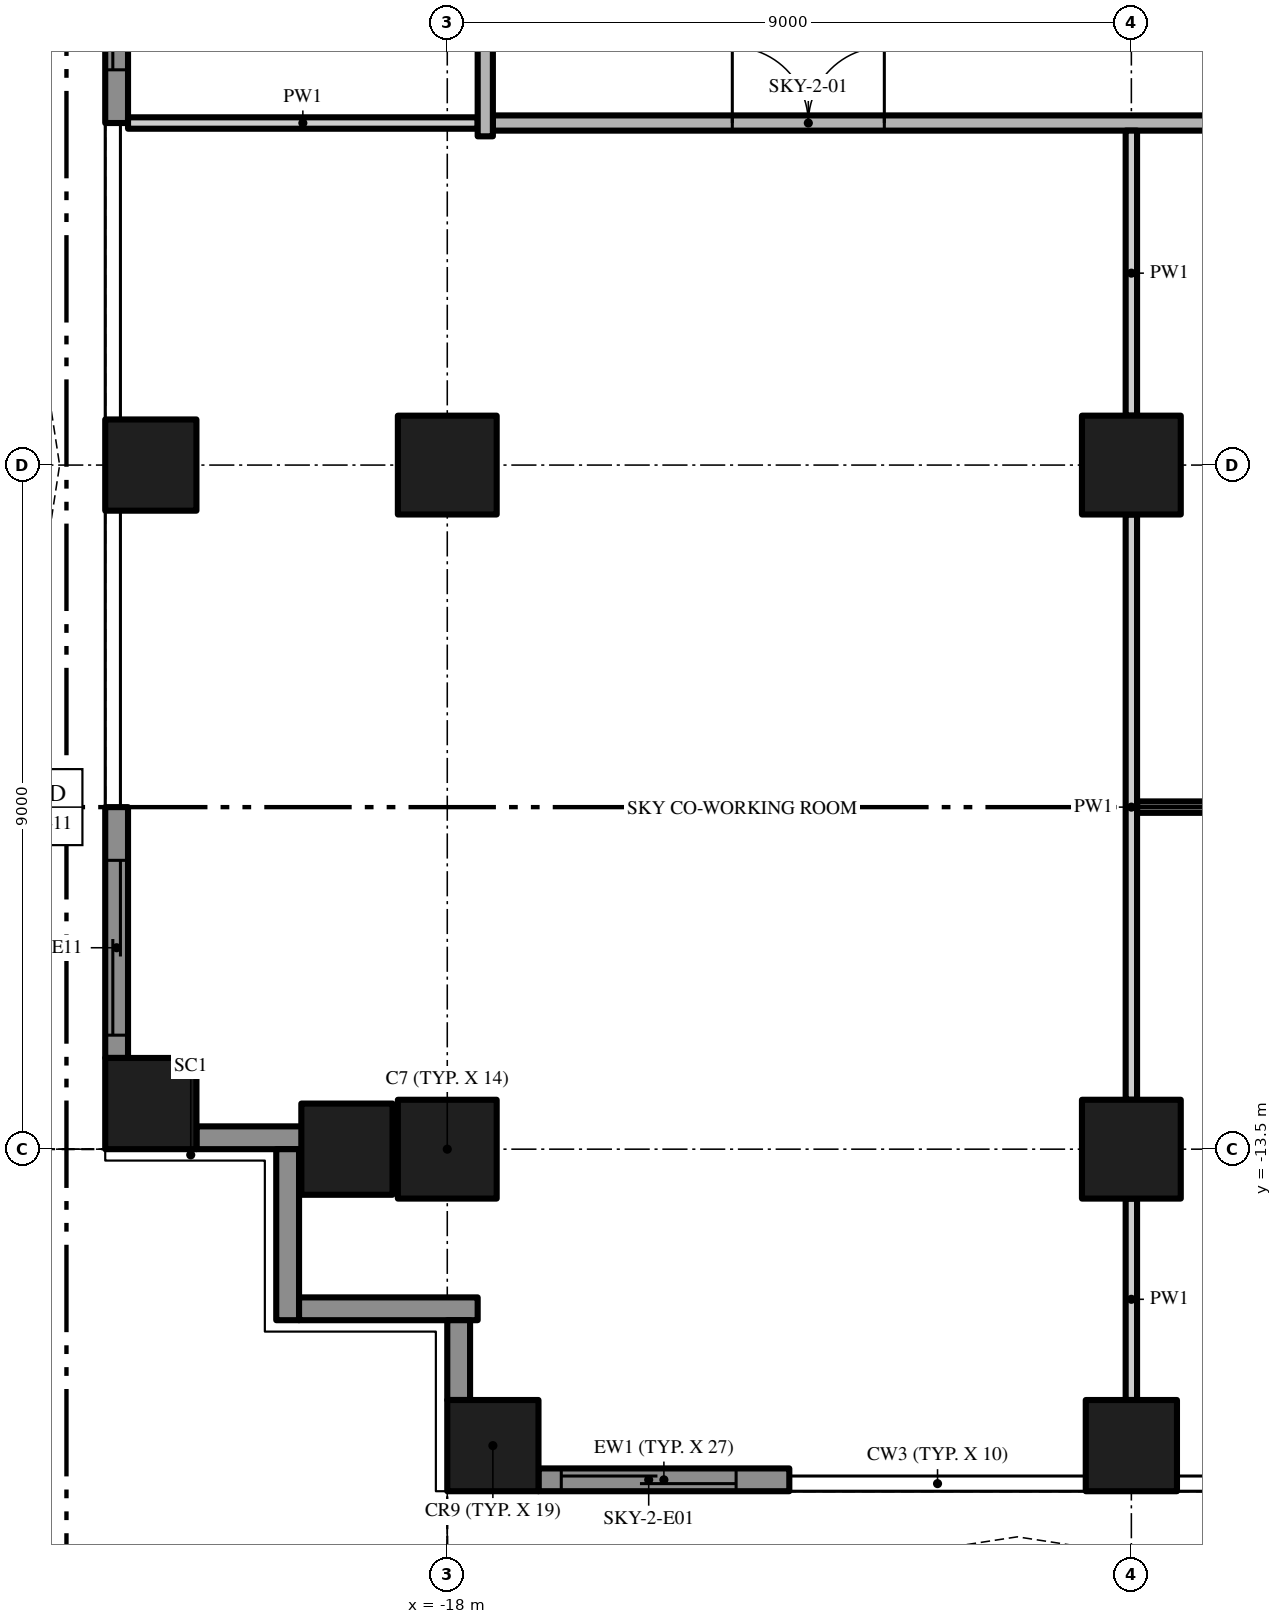
"""IFC4 building model, lengths in metres.
Left out: names, types, materials, properties, quantities, classifications, styles, units other than length and angle.
Written with IfcOpenShell. Run it as: python <this file> out.ifc"""

import sys

from ifc_helpers import new_model, si_unit, direction, frame, frame_2d, origin, origin_2d, place, context, subcontext, project, spatial, polyline, rectangle, outline, extrude, element, fill, save


model = new_model("IFC4")
c1 = context("Model", 3, precision=1e-05, world=origin(), true_north=direction((0.0, 1.0)))
c2 = subcontext(c1, "Body", "Model", "MODEL_VIEW")
j1 = project(units=[si_unit("LENGTHUNIT", "METRE"), si_unit("PLANEANGLEUNIT", "RADIAN")], contexts=[c1])
p1 = place(None, origin())
s1 = spatial("IfcSite", under=j1, at=p1, CompositionType="ELEMENT")
p2 = place(p1, origin())
s2 = spatial("IfcBuilding", under=s1, at=p2, CompositionType="ELEMENT")
p3 = place(p2, frame((0.0, 0.0, 120.0)))
s3 = spatial("IfcBuildingStorey", under=s2, at=p3, CompositionType="ELEMENT", Elevation=120.0)
p4 = place(p3, frame((-18.0, -13.5, 0.0), z_axis=(0.0, 0.0, 1.0), x_axis=(1.0, 0.0, 0.0)))
e1 = element("IfcColumn", 1, at=p4, inside=s3, PredefinedType="COLUMN", context=c2, shape_type="SweptSolid", body=[
    extrude(rectangle(XDim=1.3, YDim=1.3, at=origin_2d()), origin(), (0.0, 0.0, 1.0), 4.7),
])
p5 = place(p3, frame((-17.4, -17.4, 0.0), z_axis=(0.0, 0.0, 1.0), x_axis=(1.0, 0.0, 0.0)))
e2 = element("IfcColumn", 2, at=p5, inside=s3, PredefinedType="COLUMN", context=c2, shape_type="SweptSolid", body=[
    extrude(rectangle(XDim=1.2, YDim=1.2, at=origin_2d()), origin(), (0.0, 0.0, 1.0), 4.7),
])
p6 = place(p3, frame((-18.0, -4.5, 0.0), z_axis=(0.0, 0.0, 1.0), x_axis=(1.0, 0.0, 0.0)))
e3 = element("IfcColumn", 3, at=p6, inside=s3, PredefinedType="COLUMN", context=c2, shape_type="SweptSolid", body=[
    extrude(rectangle(XDim=1.3, YDim=1.3, at=origin_2d()), origin(), (0.0, 0.0, 1.0), 4.7),
])
for number, where, z_axis, x_axis in (
    (4, (-21.9, -12.9, 0.0), (0.0, 0.0, 1.0), (1.0, 0.0, 0.0)),
    (5, (-19.32, -13.5, 0.0), (0.0, 0.0, 1.0), (1.0, 0.0, 0.0)),
    (6, (-21.9, -4.5, 0.0), (0.0, 0.0, 1.0), (1.0, 0.0, 0.0)),
):
    element("IfcColumn", number, at=place(p3, frame(where, z_axis=z_axis, x_axis=x_axis)), inside=s3, PredefinedType="COLUMN", context=c2, shape_type="SweptSolid", body=[
        extrude(rectangle(XDim=1.2, YDim=1.2, at=origin_2d()), origin(), (0.0, 0.0, 1.0), 4.7),
    ])
p7 = place(p3, frame((-9.0, -13.5, 0.0), z_axis=(0.0, 0.0, 1.0), x_axis=(1.0, 0.0, 0.0)))
e7 = element("IfcColumn", 7, at=p7, inside=s3, PredefinedType="COLUMN", context=c2, shape_type="SweptSolid", body=[
    extrude(rectangle(XDim=1.3, YDim=1.3, at=origin_2d()), origin(), (0.0, 0.0, 1.0), 4.7),
])
p8 = place(p3, frame((-9.0, -17.4, 0.0), z_axis=(0.0, 0.0, 1.0), x_axis=(1.0, 0.0, 0.0)))
e8 = element("IfcColumn", 8, at=p8, inside=s3, PredefinedType="COLUMN", context=c2, shape_type="SweptSolid", body=[
    extrude(rectangle(XDim=1.2, YDim=1.2, at=origin_2d()), origin(), (0.0, 0.0, 1.0), 4.7),
])
p9 = place(p3, frame((-9.0, -4.5, 0.0), z_axis=(0.0, 0.0, 1.0), x_axis=(1.0, 0.0, 0.0)))
e9 = element("IfcColumn", 9, at=p9, inside=s3, PredefinedType="COLUMN", context=c2, shape_type="SweptSolid", body=[
    extrude(rectangle(XDim=1.3, YDim=1.3, at=origin_2d()), origin(), (0.0, 0.0, 1.0), 4.7),
])
p10 = place(p3, frame((-13.5, -17.85, 0.0), z_axis=(0.0, 0.0, 1.0), x_axis=(-1.0, 0.0, 0.0)))
e10 = element("IfcWall", 10, at=p10, inside=s3, PredefinedType="SOLIDWALL", context=c2, shape_type="SweptSolid", body=[
    extrude(rectangle(XDim=3.3, YDim=0.3, at=frame_2d((1.65, 0.0))), origin(), (0.0, 0.0, 1.0), 4.7),
])
p11 = place(p10, frame((0.7, 0.0, 0.0)))
e11 = element("IfcOpeningElement", 11, at=p11, cuts=e10, PredefinedType="OPENING", context=c2, shape_type="SweptSolid", body=[
    extrude(rectangle(XDim=2.3, YDim=2.4, at=frame_2d((1.15, 1.2))), frame((0.0, 0.16, 0.0), z_axis=(0.0, -1.0, 0.0), x_axis=(1.0, 0.0, 0.0)), (0.0, 0.0, 1.0), 0.32),
])
p12 = place(p3, frame((-22.35, 0.0, 0.0), z_axis=(0.0, 0.0, 1.0), x_axis=(0.0, 1.0, 0.0)))
e12 = element("IfcWall", 12, at=p12, inside=s3, PredefinedType="SOLIDWALL", context=c2, shape_type="SweptSolid", body=[
    extrude(rectangle(XDim=3.9, YDim=0.3, at=frame_2d((1.95, 0.0))), origin(), (0.0, 0.0, 1.0), 4.7),
])
p13 = place(p12, frame((0.7, 0.0, 0.0)))
e13 = element("IfcOpeningElement", 13, at=p13, cuts=e12, PredefinedType="OPENING", context=c2, shape_type="SweptSolid", body=[
    extrude(rectangle(XDim=2.9, YDim=2.4, at=frame_2d((1.45, 1.2))), frame((0.0, 0.16, 0.0), z_axis=(0.0, -1.0, 0.0), x_axis=(1.0, 0.0, 0.0)), (0.0, 0.0, 1.0), 0.32),
])
p14 = place(p3, frame((-22.35, -12.3, 0.0), z_axis=(0.0, 0.0, 1.0), x_axis=(0.0, 1.0, 0.0)))
e14 = element("IfcWall", 14, at=p14, inside=s3, PredefinedType="SOLIDWALL", context=c2, shape_type="SweptSolid", body=[
    extrude(rectangle(XDim=3.3, YDim=0.3, at=frame_2d((1.65, 0.0))), origin(), (0.0, 0.0, 1.0), 4.7),
])
p15 = place(p14, frame((0.3, 0.0, 0.0)))
e15 = element("IfcOpeningElement", 15, at=p15, cuts=e14, PredefinedType="OPENING", context=c2, shape_type="SweptSolid", body=[
    extrude(rectangle(XDim=2.3, YDim=2.4, at=frame_2d((1.15, 1.2))), frame((0.0, 0.16, 0.0), z_axis=(0.0, -1.0, 0.0), x_axis=(1.0, 0.0, 0.0)), (0.0, 0.0, 1.0), 0.32),
])
p16 = place(p3, frame((-19.85, -13.35, 0.0), z_axis=(0.0, 0.0, 1.0), x_axis=(-1.0, 0.0, 0.0)))
e16 = element("IfcWall", 16, at=p16, inside=s3, PredefinedType="SOLIDWALL", context=c2, shape_type="SweptSolid", body=[
    extrude(rectangle(XDim=1.45, YDim=0.3, at=frame_2d((0.725, 0.0))), origin(), (0.0, 0.0, 1.0), 4.7),
])
p17 = place(p3, frame((-20.1, -15.75, 0.0), z_axis=(0.0, 0.0, 1.0), x_axis=(0.0, 1.0, 0.0)))
e17 = element("IfcWall", 17, at=p17, inside=s3, PredefinedType="SOLIDWALL", context=c2, shape_type="SweptSolid", body=[
    extrude(rectangle(XDim=2.25, YDim=0.3, at=frame_2d((1.125, 0.0))), origin(), (0.0, 0.0, 1.0), 4.7),
])
p18 = place(p3, frame((-17.6, -15.6, 0.0), z_axis=(0.0, 0.0, 1.0), x_axis=(-1.0, 0.0, 0.0)))
e18 = element("IfcWall", 18, at=p18, inside=s3, PredefinedType="SOLIDWALL", context=c2, shape_type="SweptSolid", body=[
    extrude(rectangle(XDim=2.35, YDim=0.3, at=frame_2d((1.175, 0.0))), origin(), (0.0, 0.0, 1.0), 4.7),
])
p19 = place(p3, frame((-17.85, -16.8, 0.0), z_axis=(0.0, 0.0, 1.0), x_axis=(0.0, 1.0, 0.0)))
e19 = element("IfcWall", 19, at=p19, inside=s3, PredefinedType="SOLIDWALL", context=c2, shape_type="SweptSolid", body=[
    extrude(rectangle(XDim=1.05, YDim=0.3, at=frame_2d((0.525, 0.0))), origin(), (0.0, 0.0, 1.0), 4.7),
])
p20 = place(p3, origin())
e20 = element("IfcWall", 20, at=p20, inside=s3, PredefinedType="USERDEFINED", context=c2, shape_type="SweptSolid", body=[
    extrude(outline(polyline([(-18.0, -21.0), (-16.5, -20.771), (-15.0, -20.171), (-13.5, -19.429), (-12.0, -18.829), (-10.5, -18.6), (-9.0, -18.829), (-7.5, -19.429), (-6.0, -20.171), (-4.5, -20.771), (-3.0, -21.0), (-1.5, -20.771), (0.0, -20.171), (1.5, -19.429), (3.0, -18.829), (4.5, -18.6), (6.0, -18.829), (7.5, -19.429), (9.0, -20.171), (10.5, -20.771), (12.0, -21.0), (13.5, -20.771), (15.0, -20.171), (16.5, -19.429), (18.0, -18.829), (17.907, -18.597), (16.398, -19.201), (14.898, -19.942), (13.434, -20.528), (12.0, -20.747), (10.566, -20.528), (9.102, -19.942), (7.602, -19.201), (6.066, -18.586), (4.5, -18.347), (2.934, -18.586), (1.398, -19.201), (-0.102, -19.942), (-1.566, -20.528), (-3.0, -20.747), (-4.434, -20.528), (-5.898, -19.942), (-7.398, -19.201), (-8.934, -18.586), (-10.5, -18.347), (-12.066, -18.586), (-13.602, -19.201), (-15.102, -19.942), (-16.566, -20.528), (-18.038, -20.753), (-18.0, -21.0)])), origin(), (0.0, 0.0, 1.0), 0.9),
])
p21 = place(p3, origin())
e21 = element("IfcWall", 21, at=p21, inside=s3, PredefinedType="USERDEFINED", context=c2, shape_type="SweptSolid", body=[
    extrude(outline(polyline([(-25.5, 18.0), (-25.271, 16.5), (-24.671, 15.0), (-23.929, 13.5), (-23.329, 12.0), (-23.1, 10.5), (-23.329, 9.0), (-23.929, 7.5), (-24.671, 6.0), (-25.271, 4.5), (-25.5, 3.0), (-25.271, 1.5), (-24.671, 0.0), (-23.929, -1.5), (-23.329, -3.0), (-23.1, -4.5), (-23.329, -6.0), (-23.929, -7.5), (-24.671, -9.0), (-25.271, -10.5), (-25.5, -12.0), (-25.271, -13.5), (-25.024, -13.462), (-25.247, -12.0), (-25.028, -10.566), (-24.442, -9.102), (-23.701, -7.602), (-23.086, -6.066), (-22.847, -4.5), (-23.086, -2.934), (-23.701, -1.398), (-24.442, 0.102), (-25.028, 1.566), (-25.247, 3.0), (-25.028, 4.434), (-24.442, 5.898), (-23.701, 7.398), (-23.086, 8.934), (-22.847, 10.5), (-23.086, 12.066), (-23.701, 13.602), (-24.442, 15.102), (-25.028, 16.566), (-25.253, 18.038), (-25.5, 18.0)])), origin(), (0.0, 0.0, 1.0), 0.9),
])
p22 = place(p3, frame((-8.925, -9.0, 0.0), z_axis=(0.0, 0.0, 1.0), x_axis=(1.0, 0.0, 0.0)))
e22 = element("IfcWall", 22, at=p22, inside=s3, PredefinedType="PARTITIONING", context=c2, shape_type="SweptSolid", body=[
    extrude(rectangle(XDim=17.85, YDim=0.15, at=frame_2d((8.925, 0.0))), origin(), (0.0, 0.0, 1.0), 4.7),
])
p23 = place(p22, frame((8.05, 0.0, 0.0)))
e23 = element("IfcOpeningElement", 23, at=p23, cuts=e22, PredefinedType="OPENING", context=c2, shape_type="SweptSolid", body=[
    extrude(rectangle(XDim=1.8, YDim=2.4, at=frame_2d((0.9, 1.2))), frame((0.0, 0.085, 0.0), z_axis=(0.0, -1.0, 0.0), x_axis=(1.0, 0.0, 0.0)), (0.0, 0.0, 1.0), 0.17),
])
p24 = place(p3, frame((-17.4, 0.0, 0.0), z_axis=(0.0, 0.0, 1.0), x_axis=(1.0, 0.0, 0.0)))
e24 = element("IfcWall", 24, at=p24, inside=s3, PredefinedType="PARTITIONING", context=c2, shape_type="SweptSolid", body=[
    extrude(rectangle(XDim=34.8, YDim=0.2, at=frame_2d((17.4, 0.0))), origin(), (0.0, 0.0, 1.0), 4.7),
])
p25 = place(p24, frame((3.15, 0.0, 0.0)))
e25 = element("IfcOpeningElement", 25, at=p25, cuts=e24, PredefinedType="OPENING", context=c2, shape_type="SweptSolid", body=[
    extrude(rectangle(XDim=2.0, YDim=2.4, at=frame_2d((1.0, 1.2))), frame((0.0, 0.11, 0.0), z_axis=(0.0, -1.0, 0.0), x_axis=(1.0, 0.0, 0.0)), (0.0, 0.0, 1.0), 0.22),
])
p26 = place(p24, frame((16.4, 0.0, 0.0)))
e26 = element("IfcOpeningElement", 26, at=p26, cuts=e24, PredefinedType="OPENING", context=c2, shape_type="SweptSolid", body=[
    extrude(rectangle(XDim=2.0, YDim=2.4, at=frame_2d((1.0, 1.2))), frame((0.0, 0.11, 0.0), z_axis=(0.0, -1.0, 0.0), x_axis=(1.0, 0.0, 0.0)), (0.0, 0.0, 1.0), 0.22),
])
p27 = place(p24, frame((29.65, 0.0, 0.0)))
e27 = element("IfcOpeningElement", 27, at=p27, cuts=e24, PredefinedType="OPENING", context=c2, shape_type="SweptSolid", body=[
    extrude(rectangle(XDim=2.0, YDim=2.4, at=frame_2d((1.0, 1.2))), frame((0.0, 0.11, 0.0), z_axis=(0.0, -1.0, 0.0), x_axis=(1.0, 0.0, 0.0)), (0.0, 0.0, 1.0), 0.22),
])
p28 = place(p3, frame((-22.2, 0.0, 0.0), z_axis=(0.0, 0.0, 1.0), x_axis=(1.0, 0.0, 0.0)))
e28 = element("IfcWall", 28, at=p28, inside=s3, PredefinedType="PARTITIONING", context=c2, shape_type="SweptSolid", body=[
    extrude(rectangle(XDim=4.6, YDim=0.15, at=frame_2d((2.3, 0.0))), origin(), (0.0, 0.0, 1.0), 4.7),
])
p29 = place(p3, frame((-17.5, -0.175, 0.0), z_axis=(0.0, 0.0, 1.0), x_axis=(0.0, 1.0, 0.0)))
e29 = element("IfcWall", 29, at=p29, inside=s3, PredefinedType="PARTITIONING", context=c2, shape_type="SweptSolid", body=[
    extrude(rectangle(XDim=4.025, YDim=0.2, at=frame_2d((2.013, 0.0))), origin(), (0.0, 0.0, 1.0), 4.7),
])
p30 = place(p3, frame((-9.0, -16.8, 0.0), z_axis=(0.0, 0.0, 1.0), x_axis=(0.0, 1.0, 0.0)))
e30 = element("IfcWall", 30, at=p30, inside=s3, PredefinedType="PARTITIONING", context=c2, shape_type="SweptSolid", body=[
    extrude(rectangle(XDim=2.65, YDim=0.15, at=frame_2d((1.325, 0.0))), origin(), (0.0, 0.0, 1.0), 4.7),
])
p31 = place(p3, frame((-9.0, -12.85, 0.0), z_axis=(0.0, 0.0, 1.0), x_axis=(0.0, 1.0, 0.0)))
e31 = element("IfcWall", 31, at=p31, inside=s3, PredefinedType="PARTITIONING", context=c2, shape_type="SweptSolid", body=[
    extrude(rectangle(XDim=7.7, YDim=0.15, at=frame_2d((3.85, 0.0))), origin(), (0.0, 0.0, 1.0), 4.7),
])
p32 = place(p3, frame((-9.0, -3.85, 0.0), z_axis=(0.0, 0.0, 1.0), x_axis=(0.0, 1.0, 0.0)))
e32 = element("IfcWall", 32, at=p32, inside=s3, PredefinedType="PARTITIONING", context=c2, shape_type="SweptSolid", body=[
    extrude(rectangle(XDim=3.75, YDim=0.15, at=frame_2d((1.875, 0.0))), origin(), (0.0, 0.0, 1.0), 4.7),
])
p33 = place(p11, origin())
e33 = element("IfcDoor", 33, at=p33, inside=s3, OperationType="SINGLE_SWING_LEFT", PredefinedType="DOOR", context=c2, shape_type="SweptSolid", body=[
    extrude(rectangle(XDim=2.3, YDim=2.4, at=frame_2d((1.15, 1.2))), frame((0.0, 0.025, 0.0), z_axis=(0.0, -1.0, 0.0), x_axis=(1.0, 0.0, 0.0)), (0.0, 0.0, 1.0), 0.05),
])
fill(e11, e33)
p34 = place(p13, origin())
e34 = element("IfcDoor", 34, at=p34, inside=s3, OperationType="SINGLE_SWING_LEFT", PredefinedType="DOOR", context=c2, shape_type="SweptSolid", body=[
    extrude(rectangle(XDim=2.9, YDim=2.4, at=frame_2d((1.45, 1.2))), frame((0.0, 0.025, 0.0), z_axis=(0.0, -1.0, 0.0), x_axis=(1.0, 0.0, 0.0)), (0.0, 0.0, 1.0), 0.05),
])
fill(e13, e34)
p35 = place(p15, origin())
e35 = element("IfcDoor", 35, at=p35, inside=s3, OperationType="SINGLE_SWING_LEFT", PredefinedType="DOOR", context=c2, shape_type="SweptSolid", body=[
    extrude(rectangle(XDim=2.3, YDim=2.4, at=frame_2d((1.15, 1.2))), frame((0.0, 0.025, 0.0), z_axis=(0.0, -1.0, 0.0), x_axis=(1.0, 0.0, 0.0)), (0.0, 0.0, 1.0), 0.05),
])
fill(e15, e35)
p36 = place(p25, origin())
e36 = element("IfcDoor", 36, at=p36, inside=s3, OperationType="DOUBLE_DOOR_SINGLE_SWING", PredefinedType="DOOR", context=c2, shape_type="SweptSolid", body=[
    extrude(rectangle(XDim=2.0, YDim=2.4, at=frame_2d((1.0, 1.2))), frame((0.0, 0.025, 0.0), z_axis=(0.0, -1.0, 0.0), x_axis=(1.0, 0.0, 0.0)), (0.0, 0.0, 1.0), 0.05),
])
fill(e25, e36)
save(model, sys.argv[1])
